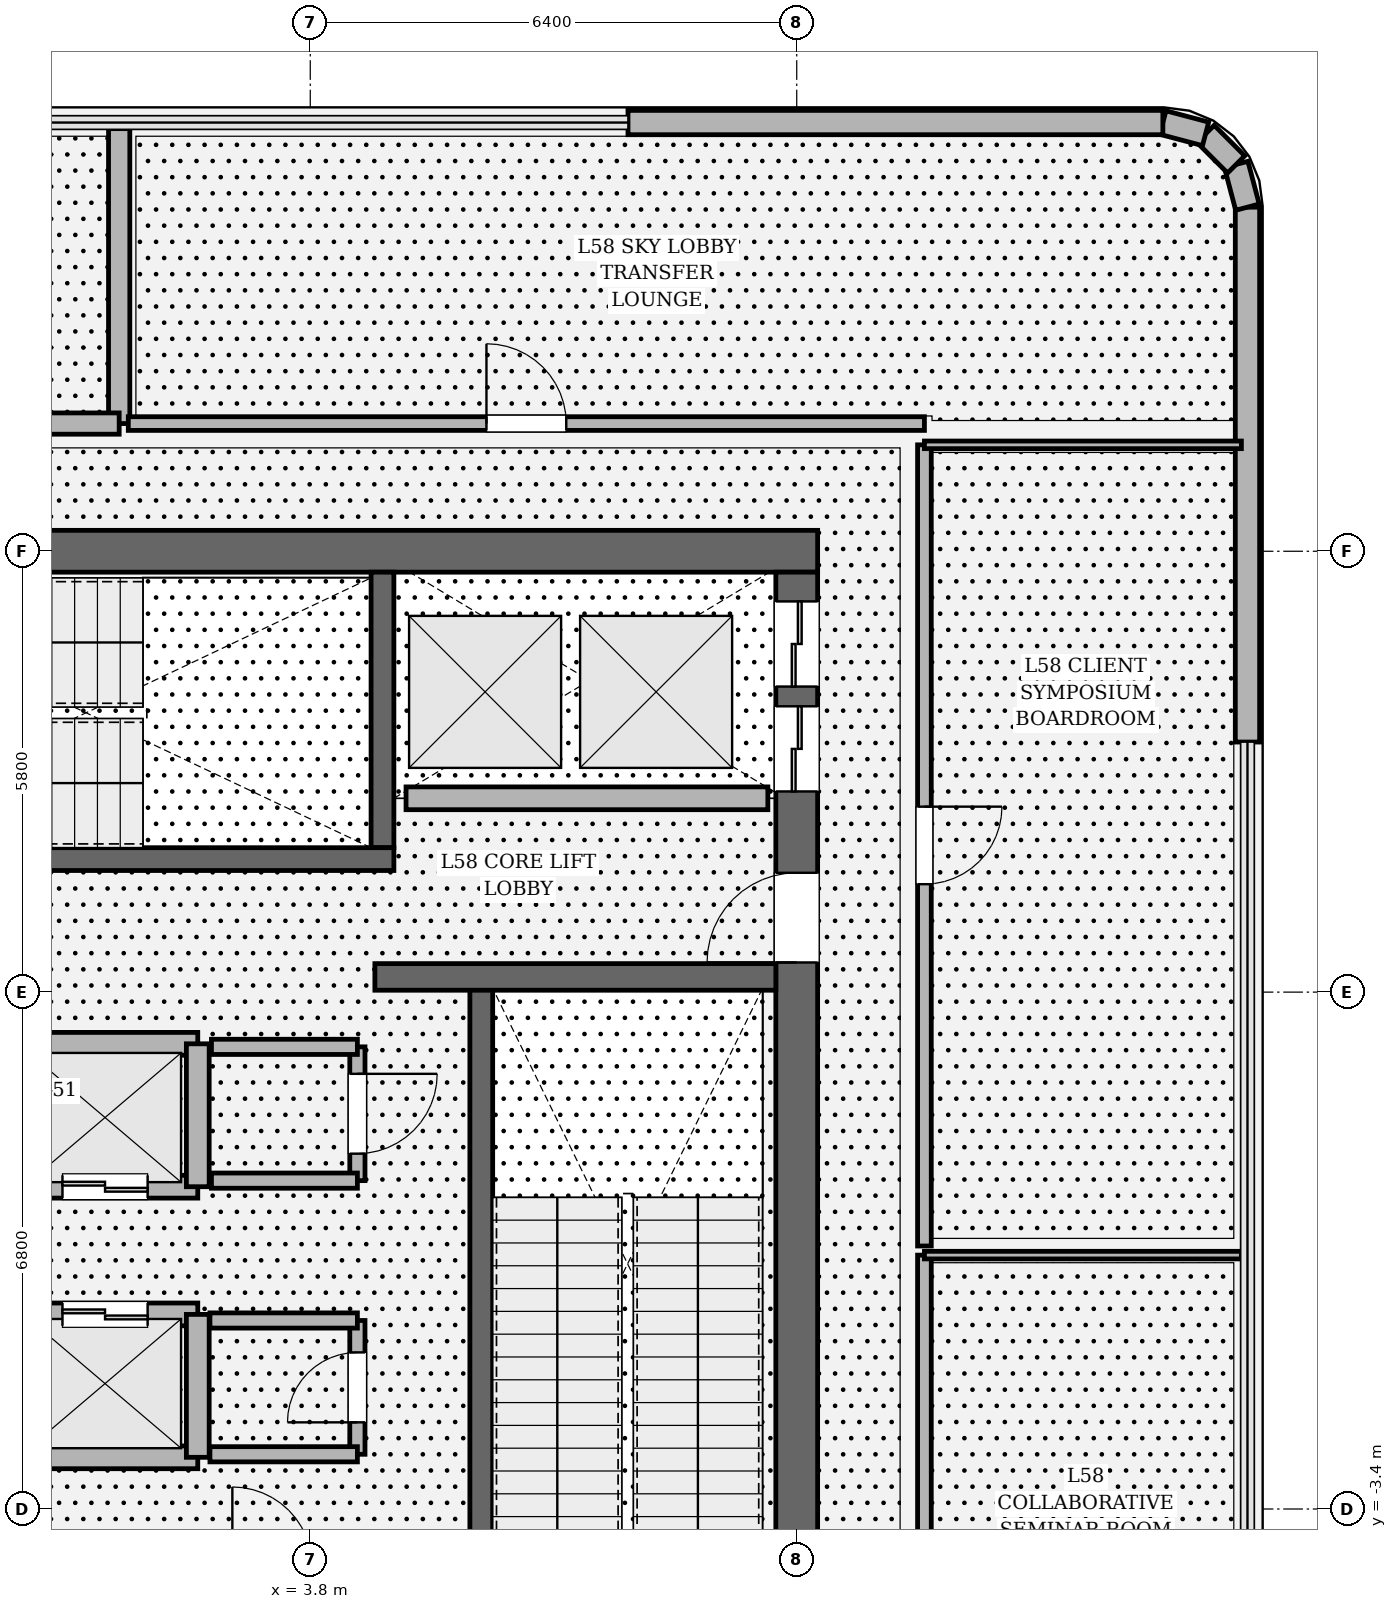
"""IFC4 building model, lengths in metres.
Left out: names, types, materials, properties, quantities, classifications, styles, units other than length and angle.
Written with IfcOpenShell. Run it as: python <this file> out.ifc"""

import sys

from ifc_helpers import new_model, si_unit, direction, frame, frame_2d, origin, place, context, subcontext, project, spatial, rectangle, extrude, element, fill, save


model = new_model("IFC4")
c1 = context("Model", 3, precision=1e-05, world=origin(), true_north=direction((0.0, 1.0)))
c2 = subcontext(c1, "Body", "Model", "MODEL_VIEW")
j1 = project(units=[si_unit("LENGTHUNIT", "METRE"), si_unit("PLANEANGLEUNIT", "RADIAN")], contexts=[c1])
p1 = place(None, origin())
s1 = spatial("IfcSite", under=j1, at=p1, CompositionType="ELEMENT")
p2 = place(p1, origin())
s2 = spatial("IfcBuilding", under=s1, at=p2, CompositionType="ELEMENT")
p3 = place(p2, frame((0.0, 0.0, 246.6)))
s3 = spatial("IfcBuildingStorey", under=s2, at=p3, CompositionType="ELEMENT", Elevation=246.6)
p4 = place(p3, frame((-10.475, 9.2, 0.0), z_axis=(0.0, 0.0, 1.0), x_axis=(1.0, 0.0, 0.0)))
e1 = element("IfcWall", 1, at=p4, inside=s3, PredefinedType="SHEAR", context=c2, shape_type="SweptSolid", body=[
    extrude(rectangle(XDim=20.95, YDim=0.55, at=frame_2d((10.475, 0.0))), origin(), (0.0, 0.0, 1.0), 4.8),
])
p5 = place(p3, frame((10.2, 8.925, 0.0), z_axis=(0.0, 0.0, 1.0), x_axis=(0.0, -1.0, 0.0)))
e2 = element("IfcWall", 2, at=p5, inside=s3, PredefinedType="SHEAR", context=c2, shape_type="SweptSolid", body=[
    extrude(rectangle(XDim=17.85, YDim=0.55, at=frame_2d((8.925, 0.0))), origin(), (0.0, 0.0, 1.0), 4.8),
])
p6 = place(p5, frame((3.955, 0.0, 0.0)))
e3 = element("IfcOpeningElement", 3, at=p6, cuts=e2, PredefinedType="OPENING", context=c2, shape_type="SweptSolid", body=[
    extrude(rectangle(XDim=1.18, YDim=2.2, at=frame_2d((0.59, 1.1))), frame((0.0, 0.285, 0.0), z_axis=(0.0, -1.0, 0.0), x_axis=(1.0, 0.0, 0.0)), (0.0, 0.0, 1.0), 0.57),
])
p7 = place(p5, frame((1.765, 0.0, 0.0)))
e4 = element("IfcOpeningElement", 4, at=p7, cuts=e2, PredefinedType="OPENING", context=c2, shape_type="SweptSolid", body=[
    extrude(rectangle(XDim=1.12, YDim=2.25, at=frame_2d((0.56, 1.125))), frame((0.0, 0.285, 0.0), z_axis=(0.0, -1.0, 0.0), x_axis=(1.0, 0.0, 0.0)), (0.0, 0.0, 1.0), 0.57),
])
p8 = place(p5, frame((0.385, 0.0, 0.0)))
e5 = element("IfcOpeningElement", 5, at=p8, cuts=e2, PredefinedType="OPENING", context=c2, shape_type="SweptSolid", body=[
    extrude(rectangle(XDim=1.12, YDim=2.25, at=frame_2d((0.56, 1.125))), frame((0.0, 0.285, 0.0), z_axis=(0.0, -1.0, 0.0), x_axis=(1.0, 0.0, 0.0)), (0.0, 0.0, 1.0), 0.57),
])
p9 = place(p3, frame((6.05, 3.45, 0.0), z_axis=(0.0, 0.0, 1.0), x_axis=(0.0, -1.0, 0.0)))
e6 = element("IfcWall", 6, at=p9, inside=s3, PredefinedType="SOLIDWALL", context=c2, shape_type="SweptSolid", body=[
    extrude(rectangle(XDim=8.95, YDim=0.3, at=frame_2d((4.475, 0.0))), origin(), (0.0, 0.0, 1.0), 4.8),
])
p10 = place(p3, frame((4.75, 8.925, 0.0), z_axis=(0.0, 0.0, 1.0), x_axis=(0.0, -1.0, 0.0)))
e7 = element("IfcWall", 7, at=p10, inside=s3, PredefinedType="SOLIDWALL", context=c2, shape_type="SweptSolid", body=[
    extrude(rectangle(XDim=3.625, YDim=0.3, at=frame_2d((1.812, 0.0))), origin(), (0.0, 0.0, 1.0), 4.8),
])
p11 = place(p3, frame((-4.9, 5.15, 0.0), z_axis=(0.0, 0.0, 1.0), x_axis=(1.0, 0.0, 0.0)))
e8 = element("IfcWall", 8, at=p11, inside=s3, PredefinedType="SOLIDWALL", context=c2, shape_type="SweptSolid", body=[
    extrude(rectangle(XDim=9.8, YDim=0.3, at=frame_2d((4.9, 0.0))), origin(), (0.0, 0.0, 1.0), 4.8),
])
p12 = place(p11, frame((0.56, 0.0, 0.0)))
e9 = element("IfcOpeningElement", 9, at=p12, cuts=e8, PredefinedType="OPENING", context=c2, shape_type="SweptSolid", body=[
    extrude(rectangle(XDim=1.18, YDim=2.2, at=frame_2d((0.59, 1.1))), frame((0.0, 0.16, 0.0), z_axis=(0.0, -1.0, 0.0), x_axis=(1.0, 0.0, 0.0)), (0.0, 0.0, 1.0), 0.32),
])
p13 = place(p3, frame((4.65, 3.6, 0.0), z_axis=(0.0, 0.0, 1.0), x_axis=(1.0, 0.0, 0.0)))
e10 = element("IfcWall", 10, at=p13, inside=s3, PredefinedType="SOLIDWALL", context=c2, shape_type="SweptSolid", body=[
    extrude(rectangle(XDim=5.275, YDim=0.35, at=frame_2d((2.638, 0.0))), origin(), (0.0, 0.0, 1.0), 4.8),
])
p14 = place(p3, frame((16.13, 6.69, 0.0), z_axis=(0.0, 0.0, 1.0), x_axis=(0.0, 1.0, 0.0)))
e11 = element("IfcWall", 11, at=p14, inside=s3, PredefinedType="SOLIDWALL", context=c2, shape_type="SweptSolid", body=[
    extrude(rectangle(XDim=7.037, YDim=0.32, at=frame_2d((3.519, 0.0))), origin(), (0.0, 0.0, 1.0), 3.194),
])
p15 = place(p3, frame((16.13, 13.727, 0.0), z_axis=(0.0, 0.0, 1.0), x_axis=(-0.255650250031, 0.966769336325, 0.0)))
e12 = element("IfcWall", 12, at=p15, inside=s3, PredefinedType="SOLIDWALL", context=c2, shape_type="SweptSolid", body=[
    extrude(rectangle(XDim=0.582, YDim=0.32, at=frame_2d((0.291, 0.0))), origin(), (0.0, 0.0, 1.0), 4.52),
])
p16 = place(p3, frame((15.981, 14.289, 0.0), z_axis=(0.0, 0.0, 1.0), x_axis=(-0.707106781187, 0.707106781187, 0.0)))
e13 = element("IfcWall", 13, at=p16, inside=s3, PredefinedType="SOLIDWALL", context=c2, shape_type="SweptSolid", body=[
    extrude(rectangle(XDim=0.569, YDim=0.32, at=frame_2d((0.284, 0.0))), origin(), (0.0, 0.0, 1.0), 4.52),
])
p17 = place(p3, frame((15.579, 14.691, 0.0), z_axis=(0.0, 0.0, 1.0), x_axis=(-0.966665515501, 0.256042537758, 0.0)))
e14 = element("IfcWall", 14, at=p17, inside=s3, PredefinedType="SOLIDWALL", context=c2, shape_type="SweptSolid", body=[
    extrude(rectangle(XDim=0.582, YDim=0.32, at=frame_2d((0.291, 0.0))), origin(), (0.0, 0.0, 1.0), 4.52),
])
p18 = place(p3, frame((15.017, 14.84, 0.0), z_axis=(0.0, 0.0, 1.0), x_axis=(-1.0, 0.0, 0.0)))
e15 = element("IfcWall", 15, at=p18, inside=s3, PredefinedType="SOLIDWALL", context=c2, shape_type="SweptSolid", body=[
    extrude(rectangle(XDim=7.037, YDim=0.32, at=frame_2d((3.519, 0.0))), origin(), (0.0, 0.0, 1.0), 3.194),
])
p19 = place(p3, frame((-4.52, -0.84, 0.0), z_axis=(0.0, 0.0, 1.0), x_axis=(1.0, 0.0, 0.0)))
e16 = element("IfcWall", 16, at=p19, inside=s3, PredefinedType="SOLIDWALL", context=c2, shape_type="SweptSolid", body=[
    extrude(rectangle(XDim=6.84, YDim=0.3, at=frame_2d((3.42, 0.0))), origin(), (0.0, 0.0, 1.0), 4.52),
])
p20 = place(p19, frame((0.66, 0.0, 0.0)))
e17 = element("IfcOpeningElement", 17, at=p20, cuts=e16, PredefinedType="OPENING", context=c2, shape_type="SweptSolid", body=[
    extrude(rectangle(XDim=1.12, YDim=2.25, at=frame_2d((0.56, 1.125))), frame((0.0, 0.16, 0.0), z_axis=(0.0, -1.0, 0.0), x_axis=(1.0, 0.0, 0.0)), (0.0, 0.0, 1.0), 0.32),
])
p21 = place(p19, frame((2.86, 0.0, 0.0)))
e18 = element("IfcOpeningElement", 18, at=p21, cuts=e16, PredefinedType="OPENING", context=c2, shape_type="SweptSolid", body=[
    extrude(rectangle(XDim=1.12, YDim=2.25, at=frame_2d((0.56, 1.125))), frame((0.0, 0.16, 0.0), z_axis=(0.0, -1.0, 0.0), x_axis=(1.0, 0.0, 0.0)), (0.0, 0.0, 1.0), 0.32),
])
p22 = place(p19, frame((5.06, 0.0, 0.0)))
e19 = element("IfcOpeningElement", 19, at=p22, cuts=e16, PredefinedType="OPENING", context=c2, shape_type="SweptSolid", body=[
    extrude(rectangle(XDim=1.12, YDim=2.25, at=frame_2d((0.56, 1.125))), frame((0.0, 0.16, 0.0), z_axis=(0.0, -1.0, 0.0), x_axis=(1.0, 0.0, 0.0)), (0.0, 0.0, 1.0), 0.32),
])
p23 = place(p3, frame((-4.52, -2.72, 0.0), z_axis=(0.0, 0.0, 1.0), x_axis=(1.0, 0.0, 0.0)))
e20 = element("IfcWall", 20, at=p23, inside=s3, PredefinedType="SOLIDWALL", context=c2, shape_type="SweptSolid", body=[
    extrude(rectangle(XDim=6.84, YDim=0.3, at=frame_2d((3.42, 0.0))), origin(), (0.0, 0.0, 1.0), 4.52),
])
p24 = place(p3, frame((2.32, -2.72, 0.0), z_axis=(0.0, 0.0, 1.0), x_axis=(0.0, 1.0, 0.0)))
e21 = element("IfcWall", 21, at=p24, inside=s3, PredefinedType="SOLIDWALL", context=c2, shape_type="SweptSolid", body=[
    extrude(rectangle(XDim=1.88, YDim=0.3, at=frame_2d((0.94, 0.0))), origin(), (0.0, 0.0, 1.0), 4.52),
])
p25 = place(p3, frame((-2.32, 0.84, 0.0), z_axis=(0.0, 0.0, 1.0), x_axis=(1.0, 0.0, 0.0)))
e22 = element("IfcWall", 22, at=p25, inside=s3, PredefinedType="SOLIDWALL", context=c2, shape_type="SweptSolid", body=[
    extrude(rectangle(XDim=4.64, YDim=0.3, at=frame_2d((2.32, 0.0))), origin(), (0.0, 0.0, 1.0), 4.52),
])
p26 = place(p25, frame((0.66, 0.0, 0.0)))
e23 = element("IfcOpeningElement", 23, at=p26, cuts=e22, PredefinedType="OPENING", context=c2, shape_type="SweptSolid", body=[
    extrude(rectangle(XDim=1.12, YDim=2.25, at=frame_2d((0.56, 1.125))), frame((0.0, 0.16, 0.0), z_axis=(0.0, -1.0, 0.0), x_axis=(1.0, 0.0, 0.0)), (0.0, 0.0, 1.0), 0.32),
])
p27 = place(p25, frame((2.86, 0.0, 0.0)))
e24 = element("IfcOpeningElement", 24, at=p27, cuts=e22, PredefinedType="OPENING", context=c2, shape_type="SweptSolid", body=[
    extrude(rectangle(XDim=1.12, YDim=2.25, at=frame_2d((0.56, 1.125))), frame((0.0, 0.16, 0.0), z_axis=(0.0, -1.0, 0.0), x_axis=(1.0, 0.0, 0.0)), (0.0, 0.0, 1.0), 0.32),
])
p28 = place(p3, frame((-2.32, 2.72, 0.0), z_axis=(0.0, 0.0, 1.0), x_axis=(1.0, 0.0, 0.0)))
e25 = element("IfcWall", 25, at=p28, inside=s3, PredefinedType="SOLIDWALL", context=c2, shape_type="SweptSolid", body=[
    extrude(rectangle(XDim=4.64, YDim=0.3, at=frame_2d((2.32, 0.0))), origin(), (0.0, 0.0, 1.0), 4.52),
])
p29 = place(p3, frame((2.32, 0.84, 0.0), z_axis=(0.0, 0.0, 1.0), x_axis=(0.0, 1.0, 0.0)))
e26 = element("IfcWall", 26, at=p29, inside=s3, PredefinedType="SOLIDWALL", context=c2, shape_type="SweptSolid", body=[
    extrude(rectangle(XDim=1.88, YDim=0.3, at=frame_2d((0.94, 0.0))), origin(), (0.0, 0.0, 1.0), 4.52),
])
p30 = place(p3, frame((5.06, 5.95, 0.0), z_axis=(0.0, 0.0, 1.0), x_axis=(1.0, 0.0, 0.0)))
e27 = element("IfcWall", 27, at=p30, inside=s3, PredefinedType="SOLIDWALL", context=c2, shape_type="SweptSolid", body=[
    extrude(rectangle(XDim=4.76, YDim=0.3, at=frame_2d((2.38, 0.0))), origin(), (0.0, 0.0, 1.0), 4.52),
])
p31 = place(p3, frame((4.42, -2.68, 0.0), z_axis=(0.0, 0.0, 1.0), x_axis=(0.0, 1.0, 0.0)))
e28 = element("IfcWall", 28, at=p31, inside=s3, PredefinedType="SOLIDWALL", context=c2, shape_type="SweptSolid", body=[
    extrude(rectangle(XDim=1.76, YDim=0.2, at=frame_2d((0.88, 0.0))), origin(), (0.0, 0.0, 1.0), 4.52),
])
p32 = place(p31, frame((0.42, 0.0, 0.0)))
e29 = element("IfcOpeningElement", 29, at=p32, cuts=e28, PredefinedType="OPENING", context=c2, shape_type="SweptSolid", body=[
    extrude(rectangle(XDim=0.92, YDim=2.1, at=frame_2d((0.46, 1.05))), frame((0.0, 0.11, 0.0), z_axis=(0.0, -1.0, 0.0), x_axis=(1.0, 0.0, 0.0)), (0.0, 0.0, 1.0), 0.22),
])
for number, where, z_axis, x_axis in (
    (30, (4.42, -0.92, 0.0), (0.0, 0.0, 1.0), (-1.0, 0.0, 0.0)),
    (31, (2.48, -2.68, 0.0), (0.0, 0.0, 1.0), (1.0, 0.0, 0.0)),
):
    element("IfcWall", number, at=place(p3, frame(where, z_axis=z_axis, x_axis=x_axis)), inside=s3, PredefinedType="SOLIDWALL", context=c2, shape_type="SweptSolid", body=[
        extrude(rectangle(XDim=1.94, YDim=0.2, at=frame_2d((0.97, 0.0))), origin(), (0.0, 0.0, 1.0), 4.52),
    ])
p33 = place(p3, frame((4.42, 0.92, 0.0), z_axis=(0.0, 0.0, 1.0), x_axis=(0.0, 1.0, 0.0)))
e32 = element("IfcWall", 32, at=p33, inside=s3, PredefinedType="SOLIDWALL", context=c2, shape_type="SweptSolid", body=[
    extrude(rectangle(XDim=1.76, YDim=0.2, at=frame_2d((0.88, 0.0))), origin(), (0.0, 0.0, 1.0), 4.52),
])
p34 = place(p33, frame((0.355, 0.0, 0.0)))
e33 = element("IfcOpeningElement", 33, at=p34, cuts=e32, PredefinedType="OPENING", context=c2, shape_type="SweptSolid", body=[
    extrude(rectangle(XDim=1.05, YDim=2.2, at=frame_2d((0.525, 1.1))), frame((0.0, 0.11, 0.0), z_axis=(0.0, -1.0, 0.0), x_axis=(1.0, 0.0, 0.0)), (0.0, 0.0, 1.0), 0.22),
])
for number, where, z_axis, x_axis in (
    (34, (4.42, 2.68, 0.0), (0.0, 0.0, 1.0), (-1.0, 0.0, 0.0)),
    (35, (2.5, 0.92, 0.0), (0.0, 0.0, 1.0), (1.0, 0.0, 0.0)),
):
    element("IfcWall", number, at=place(p3, frame(where, z_axis=z_axis, x_axis=x_axis)), inside=s3, PredefinedType="SOLIDWALL", context=c2, shape_type="SweptSolid", body=[
        extrude(rectangle(XDim=1.92, YDim=0.2, at=frame_2d((0.96, 0.0))), origin(), (0.0, 0.0, 1.0), 4.52),
    ])
p35 = place(p3, frame((11.88, -10.6, 0.0), z_axis=(0.0, 0.0, 1.0), x_axis=(0.0, 1.0, 0.0)))
e36 = element("IfcWall", 36, at=p35, inside=s3, PredefinedType="PARTITIONING", context=c2, shape_type="SweptSolid", body=[
    extrude(rectangle(XDim=10.54, YDim=0.18, at=frame_2d((5.27, 0.0))), origin(), (0.0, 0.0, 1.0), 3.194),
])
p36 = place(p35, frame((4.76, 0.0, 0.0)))
e37 = element("IfcOpeningElement", 37, at=p36, cuts=e36, PredefinedType="OPENING", context=c2, shape_type="SweptSolid", body=[
    extrude(rectangle(XDim=1.02, YDim=2.2, at=frame_2d((0.51, 1.1))), frame((0.0, 0.1, 0.0), z_axis=(0.0, -1.0, 0.0), x_axis=(1.0, 0.0, 0.0)), (0.0, 0.0, 1.0), 0.2),
])
p37 = place(p3, frame((11.88, -0.06, 0.0), z_axis=(0.0, 0.0, 1.0), x_axis=(1.0, 0.0, 0.0)))
e38 = element("IfcWall", 38, at=p37, inside=s3, PredefinedType="PARTITIONING", context=c2, shape_type="SweptSolid", body=[
    extrude(rectangle(XDim=4.17, YDim=0.1, at=frame_2d((2.085, 0.0))), origin(), (0.0, 0.0, 1.0), 4.52),
])
p38 = place(p3, frame((11.88, 0.06, 0.0), z_axis=(0.0, 0.0, 1.0), x_axis=(0.0, 1.0, 0.0)))
e39 = element("IfcWall", 39, at=p38, inside=s3, PredefinedType="PARTITIONING", context=c2, shape_type="SweptSolid", body=[
    extrude(rectangle(XDim=10.54, YDim=0.18, at=frame_2d((5.27, 0.0))), origin(), (0.0, 0.0, 1.0), 3.194),
])
p39 = place(p38, frame((4.76, 0.0, 0.0)))
e40 = element("IfcOpeningElement", 40, at=p39, cuts=e39, PredefinedType="OPENING", context=c2, shape_type="SweptSolid", body=[
    extrude(rectangle(XDim=1.02, YDim=2.2, at=frame_2d((0.51, 1.1))), frame((0.0, 0.1, 0.0), z_axis=(0.0, -1.0, 0.0), x_axis=(1.0, 0.0, 0.0)), (0.0, 0.0, 1.0), 0.2),
])
p40 = place(p3, frame((11.88, 10.6, 0.0), z_axis=(0.0, 0.0, 1.0), x_axis=(1.0, 0.0, 0.0)))
e41 = element("IfcWall", 41, at=p40, inside=s3, PredefinedType="PARTITIONING", context=c2, shape_type="SweptSolid", body=[
    extrude(rectangle(XDim=4.17, YDim=0.1, at=frame_2d((2.085, 0.0))), origin(), (0.0, 0.0, 1.0), 4.154),
])
p41 = place(p3, frame((1.286, 14.76, 0.0), z_axis=(0.0, 0.0, 1.0), x_axis=(0.0, -1.0, 0.0)))
e42 = element("IfcWall", 42, at=p41, inside=s3, PredefinedType="SOLIDWALL", context=c2, shape_type="SweptSolid", body=[
    extrude(rectangle(XDim=3.88, YDim=0.28, at=frame_2d((1.94, 0.0))), origin(), (0.0, 0.0, 1.0), 4.52),
])
p42 = place(p3, frame((1.286, 10.88, 0.0), z_axis=(0.0, 0.0, 1.0), x_axis=(-1.0, 0.0, 0.0)))
e43 = element("IfcWall", 43, at=p42, inside=s3, PredefinedType="SOLIDWALL", context=c2, shape_type="SweptSolid", body=[
    extrude(rectangle(XDim=13.166, YDim=0.28, at=frame_2d((6.583, 0.0))), origin(), (0.0, 0.0, 1.0), 3.194),
])
p43 = place(p42, frame((5.733, 0.0, 0.0)))
e44 = element("IfcOpeningElement", 44, at=p43, cuts=e43, PredefinedType="OPENING", context=c2, shape_type="SweptSolid", body=[
    extrude(rectangle(XDim=1.7, YDim=2.3, at=frame_2d((0.85, 1.15))), frame((0.0, 0.15, 0.0), z_axis=(0.0, -1.0, 0.0), x_axis=(1.0, 0.0, 0.0)), (0.0, 0.0, 1.0), 0.3),
])
p44 = place(p3, frame((11.88, 10.88, 0.0), z_axis=(0.0, 0.0, 1.0), x_axis=(-1.0, 0.0, 0.0)))
e45 = element("IfcWall", 45, at=p44, inside=s3, PredefinedType="PARTITIONING", context=c2, shape_type="SweptSolid", body=[
    extrude(rectangle(XDim=10.474, YDim=0.18, at=frame_2d((5.237, 0.0))), origin(), (0.0, 0.0, 1.0), 3.194),
])
p45 = place(p44, frame((4.712, 0.0, 0.0)))
e46 = element("IfcOpeningElement", 46, at=p45, cuts=e45, PredefinedType="OPENING", context=c2, shape_type="SweptSolid", body=[
    extrude(rectangle(XDim=1.05, YDim=2.2, at=frame_2d((0.525, 1.1))), frame((0.0, 0.1, 0.0), z_axis=(0.0, -1.0, 0.0), x_axis=(1.0, 0.0, 0.0)), (0.0, 0.0, 1.0), 0.2),
])
p46 = place(p6, origin())
e47 = element("IfcDoor", 47, at=p46, inside=s3, OperationType="SINGLE_SWING_RIGHT", PredefinedType="DOOR", context=c2, shape_type="SweptSolid", body=[
    extrude(rectangle(XDim=1.18, YDim=2.2, at=frame_2d((0.59, 1.1))), frame((0.0, 0.025, 0.0), z_axis=(0.0, -1.0, 0.0), x_axis=(1.0, 0.0, 0.0)), (0.0, 0.0, 1.0), 0.05),
])
fill(e3, e47)
p47 = place(p22, origin())
e48 = element("IfcDoor", 48, at=p47, inside=s3, OperationType="DOUBLE_DOOR_SLIDING", PredefinedType="DOOR", context=c2, shape_type="SweptSolid", body=[
    extrude(rectangle(XDim=1.12, YDim=2.25, at=frame_2d((0.56, 1.125))), frame((0.0, 0.025, 0.0), z_axis=(0.0, -1.0, 0.0), x_axis=(1.0, 0.0, 0.0)), (0.0, 0.0, 1.0), 0.05),
])
fill(e19, e48)
p48 = place(p27, origin())
e49 = element("IfcDoor", 49, at=p48, inside=s3, OperationType="DOUBLE_DOOR_SLIDING", PredefinedType="DOOR", context=c2, shape_type="SweptSolid", body=[
    extrude(rectangle(XDim=1.12, YDim=2.25, at=frame_2d((0.56, 1.125))), frame((0.0, 0.025, 0.0), z_axis=(0.0, -1.0, 0.0), x_axis=(1.0, 0.0, 0.0)), (0.0, 0.0, 1.0), 0.05),
])
fill(e24, e49)
p49 = place(p7, origin())
e50 = element("IfcDoor", 50, at=p49, inside=s3, OperationType="DOUBLE_DOOR_SLIDING", PredefinedType="DOOR", context=c2, shape_type="SweptSolid", body=[
    extrude(rectangle(XDim=1.12, YDim=2.25, at=frame_2d((0.56, 1.125))), frame((0.0, 0.025, 0.0), z_axis=(0.0, -1.0, 0.0), x_axis=(1.0, 0.0, 0.0)), (0.0, 0.0, 1.0), 0.05),
])
fill(e4, e50)
p50 = place(p8, origin())
e51 = element("IfcDoor", 51, at=p50, inside=s3, OperationType="DOUBLE_DOOR_SLIDING", PredefinedType="DOOR", context=c2, shape_type="SweptSolid", body=[
    extrude(rectangle(XDim=1.12, YDim=2.25, at=frame_2d((0.56, 1.125))), frame((0.0, 0.025, 0.0), z_axis=(0.0, -1.0, 0.0), x_axis=(1.0, 0.0, 0.0)), (0.0, 0.0, 1.0), 0.05),
])
fill(e5, e51)
p51 = place(p32, origin())
e52 = element("IfcDoor", 52, at=p51, inside=s3, OperationType="SINGLE_SWING_LEFT", PredefinedType="DOOR", context=c2, shape_type="SweptSolid", body=[
    extrude(rectangle(XDim=0.92, YDim=2.1, at=frame_2d((0.46, 1.05))), frame((0.0, 0.025, 0.0), z_axis=(0.0, -1.0, 0.0), x_axis=(1.0, 0.0, 0.0)), (0.0, 0.0, 1.0), 0.05),
])
fill(e29, e52)
p52 = place(p34, origin())
e53 = element("IfcDoor", 53, at=p52, inside=s3, OperationType="SINGLE_SWING_RIGHT", PredefinedType="DOOR", context=c2, shape_type="SweptSolid", body=[
    extrude(rectangle(XDim=1.05, YDim=2.2, at=frame_2d((0.525, 1.1))), frame((0.0, 0.025, 0.0), z_axis=(0.0, -1.0, 0.0), x_axis=(1.0, 0.0, 0.0)), (0.0, 0.0, 1.0), 0.05),
])
fill(e33, e53)
p53 = place(p39, origin())
e54 = element("IfcDoor", 54, at=p53, inside=s3, OperationType="SINGLE_SWING_RIGHT", PredefinedType="DOOR", context=c2, shape_type="SweptSolid", body=[
    extrude(rectangle(XDim=1.02, YDim=2.2, at=frame_2d((0.51, 1.1))), frame((0.0, 0.025, 0.0), z_axis=(0.0, -1.0, 0.0), x_axis=(1.0, 0.0, 0.0)), (0.0, 0.0, 1.0), 0.05),
])
fill(e40, e54)
p54 = place(p45, origin())
e55 = element("IfcDoor", 55, at=p54, inside=s3, OperationType="SINGLE_SWING_RIGHT", PredefinedType="DOOR", context=c2, shape_type="SweptSolid", body=[
    extrude(rectangle(XDim=1.05, YDim=2.2, at=frame_2d((0.525, 1.1))), frame((0.0, 0.025, 0.0), z_axis=(0.0, -1.0, 0.0), x_axis=(1.0, 0.0, 0.0)), (0.0, 0.0, 1.0), 0.05),
])
fill(e46, e55)
save(model, sys.argv[1])
